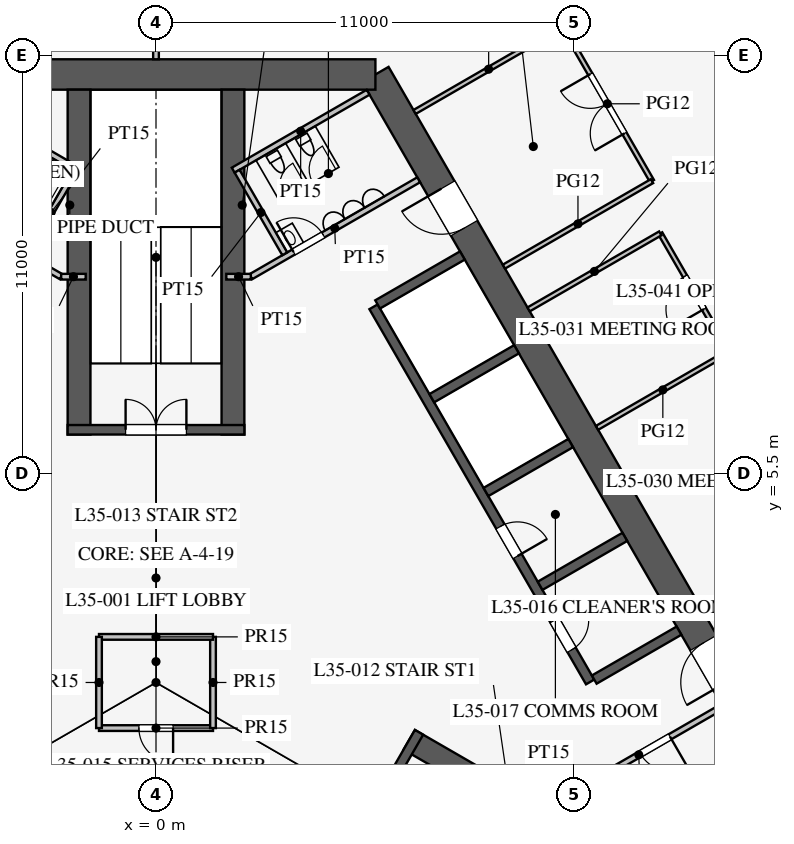
"""IFC4 building model, lengths in metres.
Left out: names, types, materials, properties, quantities, classifications, styles, units other than length and angle.
Written with IfcOpenShell. Run it as: python <this file> out.ifc"""

import sys

from ifc_helpers import new_model, si_unit, direction, frame, frame_2d, origin, place, context, subcontext, project, spatial, rectangle, extrude, element, fill, save


model = new_model("IFC4")
c1 = context("Model", 3, precision=1e-05, world=origin(), true_north=direction((0.0, 1.0)))
c2 = subcontext(c1, "Body", "Model", "MODEL_VIEW")
j1 = project(units=[si_unit("LENGTHUNIT", "METRE"), si_unit("PLANEANGLEUNIT", "RADIAN")], contexts=[c1])
p1 = place(None, origin())
s1 = spatial("IfcSite", under=j1, at=p1, CompositionType="ELEMENT")
p2 = place(p1, origin())
s2 = spatial("IfcBuilding", under=s1, at=p2, CompositionType="ELEMENT")
p3 = place(p2, frame((0.0, 0.0, 153.5)))
s3 = spatial("IfcBuildingStorey", under=s2, at=p3, CompositionType="ELEMENT", Elevation=153.5)
p4 = place(p3, frame((16.743, -3.0, 0.0), z_axis=(0.0, 0.0, 1.0), x_axis=(-0.500002442456, 0.866023993627, 0.0)))
e1 = element("IfcWall", 1, at=p4, inside=s3, PredefinedType="SHEAR", context=c2, shape_type="SweptSolid", body=[
    extrude(rectangle(XDim=21.939, YDim=0.8, at=frame_2d((10.97, 0.0))), origin(), (0.0, 0.0, 1.0), 4.2),
])
p5 = place(p4, frame((17.27, 0.0, 0.0)))
e2 = element("IfcOpeningElement", 2, at=p5, cuts=e1, PredefinedType="OPENING", context=c2, shape_type="SweptSolid", body=[
    extrude(rectangle(XDim=1.2, YDim=2.1, at=frame_2d((0.6, 1.05))), frame((0.0, 0.41, 0.0), z_axis=(0.0, -1.0, 0.0), x_axis=(1.0, 0.0, 0.0)), (0.0, 0.0, 1.0), 0.82),
])
p6 = place(p4, frame((3.47, 0.0, 0.0)))
e3 = element("IfcOpeningElement", 3, at=p6, cuts=e1, PredefinedType="OPENING", context=c2, shape_type="SweptSolid", body=[
    extrude(rectangle(XDim=1.2, YDim=2.1, at=frame_2d((0.6, 1.05))), frame((0.0, 0.41, 0.0), z_axis=(0.0, -1.0, 0.0), x_axis=(1.0, 0.0, 0.0)), (0.0, 0.0, 1.0), 0.82),
])
p7 = place(p3, frame((5.773, 16.0, 0.0), z_axis=(0.0, 0.0, 1.0), x_axis=(-1.0, 0.0, 0.0)))
e4 = element("IfcWall", 4, at=p7, inside=s3, PredefinedType="SHEAR", context=c2, shape_type="SweptSolid", body=[
    extrude(rectangle(XDim=11.547, YDim=0.8, at=frame_2d((5.773, 0.0))), origin(), (0.0, 0.0, 1.0), 4.2),
])
p8 = place(p3, frame((11.424, 0.014, 0.0), z_axis=(0.0, 0.0, 1.0), x_axis=(-0.500001763848, 0.866024385424, 0.0)))
e5 = element("IfcWall", 5, at=p8, inside=s3, PredefinedType="SHEAR", context=c2, shape_type="SweptSolid", body=[
    extrude(rectangle(XDim=11.4, YDim=0.25, at=frame_2d((5.7, 0.0))), origin(), (0.0, 0.0, 1.0), 4.2),
])
p9 = place(p8, frame((0.975, 0.0, 0.0)))
e6 = element("IfcOpeningElement", 6, at=p9, cuts=e5, PredefinedType="OPENING", context=c2, shape_type="SweptSolid", body=[
    extrude(rectangle(XDim=0.9, YDim=2.1, at=frame_2d((0.45, 1.05))), frame((0.0, 0.135, 0.0), z_axis=(0.0, -1.0, 0.0), x_axis=(1.0, 0.0, 0.0)), (0.0, 0.0, 1.0), 0.27),
])
p10 = place(p8, frame((3.825, 0.0, 0.0)))
e7 = element("IfcOpeningElement", 7, at=p10, cuts=e5, PredefinedType="OPENING", context=c2, shape_type="SweptSolid", body=[
    extrude(rectangle(XDim=0.9, YDim=2.1, at=frame_2d((0.45, 1.05))), frame((0.0, 0.135, 0.0), z_axis=(0.0, -1.0, 0.0), x_axis=(1.0, 0.0, 0.0)), (0.0, 0.0, 1.0), 0.27),
])
for number, where, z_axis, x_axis in (
    (8, (11.532, 0.076, 0.0), (0.0, 0.0, 1.0), (0.866, 0.5, 0.0)),
    (9, (10.107, 2.544, 0.0), (0.0, 0.0, 1.0), (0.866, 0.5, 0.0)),
    (10, (8.682, 5.012, 0.0), (0.0, 0.0, 1.0), (0.866, 0.5, 0.0)),
    (11, (7.257, 7.481, 0.0), (0.0, 0.0, 1.0), (0.866, 0.5, 0.0)),
):
    element("IfcWall", number, at=place(p3, frame(where, z_axis=z_axis, x_axis=x_axis)), inside=s3, PredefinedType="SHEAR", context=c2, shape_type="SweptSolid", body=[
        extrude(rectangle(XDim=2.575, YDim=0.25, at=frame_2d((1.288, 0.0))), origin(), (0.0, 0.0, 1.0), 4.2),
    ])
p11 = place(p3, frame((5.832, 9.949, 0.0), z_axis=(0.0, 0.0, 1.0), x_axis=(0.866029291668, 0.499993265928, 0.0)))
e12 = element("IfcWall", 12, at=p11, inside=s3, PredefinedType="SHEAR", context=c2, shape_type="SweptSolid", body=[
    extrude(rectangle(XDim=2.575, YDim=0.25, at=frame_2d((1.288, 0.0))), origin(), (0.0, 0.0, 1.0), 4.2),
])
p12 = place(p3, frame((6.663, -1.509, 0.0), z_axis=(0.0, 0.0, 1.0), x_axis=(0.866019375473, -0.500010441196, 0.0)))
e13 = element("IfcWall", 13, at=p12, inside=s3, PredefinedType="SHEAR", context=c2, shape_type="SweptSolid", body=[
    extrude(rectangle(XDim=9.075, YDim=0.6, at=frame_2d((4.538, 0.0))), origin(), (0.0, 0.0, 1.0), 4.2),
])
p13 = place(p3, frame((4.597, -5.339, 0.0), z_axis=(0.0, 0.0, 1.0), x_axis=(0.499984536904, 0.866034331223, 0.0)))
e14 = element("IfcWall", 14, at=p13, inside=s3, PredefinedType="SHEAR", context=c2, shape_type="SweptSolid", body=[
    extrude(rectangle(XDim=4.65, YDim=0.25, at=frame_2d((2.325, 0.0))), origin(), (0.0, 0.0, 1.0), 4.2),
])
p14 = place(p13, frame((1.525, 0.0, 0.0)))
e15 = element("IfcOpeningElement", 15, at=p14, cuts=e14, PredefinedType="OPENING", context=c2, shape_type="SweptSolid", body=[
    extrude(rectangle(XDim=1.6, YDim=2.1, at=frame_2d((0.8, 1.05))), frame((0.0, 0.135, 0.0), z_axis=(0.0, -1.0, 0.0), x_axis=(1.0, 0.0, 0.0)), (0.0, 0.0, 1.0), 0.27),
])
for number, where, z_axis, x_axis in (
    (16, (2.025, 6.525, 0.0), (0.0, 0.0, 1.0), (0.0, 1.0, 0.0)),
    (17, (-2.025, 6.525, 0.0), (0.0, 0.0, 1.0), (0.0, 1.0, 0.0)),
):
    element("IfcWall", number, at=place(p3, frame(where, z_axis=z_axis, x_axis=x_axis)), inside=s3, PredefinedType="SHEAR", context=c2, shape_type="SweptSolid", body=[
        extrude(rectangle(XDim=9.075, YDim=0.6, at=frame_2d((4.538, 0.0))), origin(), (0.0, 0.0, 1.0), 4.2),
    ])
p15 = place(p3, frame((2.325, 6.65, 0.0), z_axis=(0.0, 0.0, 1.0), x_axis=(-1.0, 0.0, 0.0)))
e18 = element("IfcWall", 18, at=p15, inside=s3, PredefinedType="SHEAR", context=c2, shape_type="SweptSolid", body=[
    extrude(rectangle(XDim=4.65, YDim=0.25, at=frame_2d((2.325, 0.0))), origin(), (0.0, 0.0, 1.0), 4.2),
])
p16 = place(p15, frame((1.525, 0.0, 0.0)))
e19 = element("IfcOpeningElement", 19, at=p16, cuts=e18, PredefinedType="OPENING", context=c2, shape_type="SweptSolid", body=[
    extrude(rectangle(XDim=1.6, YDim=2.1, at=frame_2d((0.8, 1.05))), frame((0.0, 0.135, 0.0), z_axis=(0.0, -1.0, 0.0), x_axis=(1.0, 0.0, 0.0)), (0.0, 0.0, 1.0), 0.27),
])
p17 = place(p3, frame((2.495, 10.678, 0.0), z_axis=(0.0, 0.0, 1.0), x_axis=(0.86602216432, 0.500005610874, 0.0)))
e20 = element("IfcWall", 20, at=p17, inside=s3, PredefinedType="PARTITIONING", context=c2, shape_type="SweptSolid", body=[
    extrude(rectangle(XDim=5.1, YDim=0.15, at=frame_2d((2.55, 0.0))), origin(), (0.0, 0.0, 1.0), 4.0),
])
p18 = place(p17, frame((1.3, 0.0, 0.0)))
e21 = element("IfcOpeningElement", 21, at=p18, cuts=e20, PredefinedType="OPENING", context=c2, shape_type="SweptSolid", body=[
    extrude(rectangle(XDim=0.9, YDim=2.1, at=frame_2d((0.45, 1.05))), frame((0.0, 0.085, 0.0), z_axis=(0.0, -1.0, 0.0), x_axis=(1.0, 0.0, 0.0)), (0.0, 0.0, 1.0), 0.17),
])
p19 = place(p3, frame((10.495, -3.178, 0.0), z_axis=(0.0, 0.0, 1.0), x_axis=(0.86602216432, 0.500005610874, 0.0)))
e22 = element("IfcWall", 22, at=p19, inside=s3, PredefinedType="PARTITIONING", context=c2, shape_type="SweptSolid", body=[
    extrude(rectangle(XDim=5.1, YDim=0.15, at=frame_2d((2.55, 0.0))), origin(), (0.0, 0.0, 1.0), 4.0),
])
p20 = place(p19, frame((2.6, 0.0, 0.0)))
e23 = element("IfcOpeningElement", 23, at=p20, cuts=e22, PredefinedType="OPENING", context=c2, shape_type="SweptSolid", body=[
    extrude(rectangle(XDim=0.9, YDim=2.1, at=frame_2d((0.45, 1.05))), frame((0.0, 0.085, 0.0), z_axis=(0.0, -1.0, 0.0), x_axis=(1.0, 0.0, 0.0)), (0.0, 0.0, 1.0), 0.17),
])
p21 = place(p3, frame((-2.495, 10.678, 0.0), z_axis=(0.0, 0.0, 1.0), x_axis=(-0.86602216432, 0.500005610874, 0.0)))
e24 = element("IfcWall", 24, at=p21, inside=s3, PredefinedType="PARTITIONING", context=c2, shape_type="SweptSolid", body=[
    extrude(rectangle(XDim=5.1, YDim=0.15, at=frame_2d((2.55, 0.0))), origin(), (0.0, 0.0, 1.0), 4.0),
])
p22 = place(p21, frame((2.6, 0.0, 0.0)))
e25 = element("IfcOpeningElement", 25, at=p22, cuts=e24, PredefinedType="OPENING", context=c2, shape_type="SweptSolid", body=[
    extrude(rectangle(XDim=0.9, YDim=2.1, at=frame_2d((0.45, 1.05))), frame((0.0, 0.085, 0.0), z_axis=(0.0, -1.0, 0.0), x_axis=(1.0, 0.0, 0.0)), (0.0, 0.0, 1.0), 0.17),
])
for number, where, z_axis, x_axis in (
    (26, (2.495, 10.678, 0.0), (0.0, 0.0, 1.0), (-1.0, 0.0, 0.0)),
    (27, (-2.495, 10.678, 0.0), (0.0, 0.0, 1.0), (1.0, 0.0, 0.0)),
):
    element("IfcWall", number, at=place(p3, frame(where, z_axis=z_axis, x_axis=x_axis)), inside=s3, PredefinedType="PARTITIONING", context=c2, shape_type="SweptSolid", body=[
        extrude(rectangle(XDim=0.645, YDim=0.15, at=frame_2d((0.323, 0.0))), origin(), (0.0, 0.0, 1.0), 4.0),
    ])
p23 = place(p3, frame((2.031, 13.482, 0.0), z_axis=(0.0, 0.0, 1.0), x_axis=(0.866050731258, 0.499956128963, 0.0)))
e28 = element("IfcWall", 28, at=p23, inside=s3, PredefinedType="PARTITIONING", context=c2, shape_type="SweptSolid", body=[
    extrude(rectangle(XDim=4.1, YDim=0.15, at=frame_2d((2.05, 0.0))), origin(), (0.0, 0.0, 1.0), 4.0),
])
p24 = place(p3, frame((3.389, 11.281, 0.0), z_axis=(0.0, 0.0, 1.0), x_axis=(-0.499989096993, 0.866031698547, 0.0)))
e29 = element("IfcWall", 29, at=p24, inside=s3, PredefinedType="PARTITIONING", context=c2, shape_type="SweptSolid", body=[
    extrude(rectangle(XDim=2.51, YDim=0.15, at=frame_2d((1.255, 0.0))), origin(), (0.0, 0.0, 1.0), 4.0),
])
p25 = place(p3, frame((-2.031, 13.482, 0.0), z_axis=(0.0, 0.0, 1.0), x_axis=(-0.866050731258, 0.499956128963, 0.0)))
e30 = element("IfcWall", 30, at=p25, inside=s3, PredefinedType="PARTITIONING", context=c2, shape_type="SweptSolid", body=[
    extrude(rectangle(XDim=4.1, YDim=0.15, at=frame_2d((2.05, 0.0))), origin(), (0.0, 0.0, 1.0), 4.0),
])
p26 = place(p3, frame((-3.389, 11.281, 0.0), z_axis=(0.0, 0.0, 1.0), x_axis=(0.499989096993, 0.866031698547, 0.0)))
e31 = element("IfcWall", 31, at=p26, inside=s3, PredefinedType="PARTITIONING", context=c2, shape_type="SweptSolid", body=[
    extrude(rectangle(XDim=2.51, YDim=0.15, at=frame_2d((1.255, 0.0))), origin(), (0.0, 0.0, 1.0), 4.0),
])
p27 = place(p3, frame((-1.5, -1.2, 0.0), z_axis=(0.0, 0.0, 1.0), x_axis=(1.0, 0.0, 0.0)))
e32 = element("IfcWall", 32, at=p27, inside=s3, PredefinedType="PARTITIONING", context=c2, shape_type="SweptSolid", body=[
    extrude(rectangle(XDim=3.0, YDim=0.15, at=frame_2d((1.5, 0.0))), origin(), (0.0, 0.0, 1.0), 4.0),
])
p28 = place(p27, frame((1.05, 0.0, 0.0)))
e33 = element("IfcOpeningElement", 33, at=p28, cuts=e32, PredefinedType="OPENING", context=c2, shape_type="SweptSolid", body=[
    extrude(rectangle(XDim=0.9, YDim=2.1, at=frame_2d((0.45, 1.05))), frame((0.0, 0.085, 0.0), z_axis=(0.0, -1.0, 0.0), x_axis=(1.0, 0.0, 0.0)), (0.0, 0.0, 1.0), 0.17),
])
p29 = place(p3, frame((1.5, -1.2, 0.0), z_axis=(0.0, 0.0, 1.0), x_axis=(0.0, 1.0, 0.0)))
e34 = element("IfcWall", 34, at=p29, inside=s3, PredefinedType="PARTITIONING", context=c2, shape_type="SweptSolid", body=[
    extrude(rectangle(XDim=2.4, YDim=0.15, at=frame_2d((1.2, 0.0))), origin(), (0.0, 0.0, 1.0), 4.0),
])
p30 = place(p3, frame((1.5, 1.2, 0.0), z_axis=(0.0, 0.0, 1.0), x_axis=(-1.0, 0.0, 0.0)))
e35 = element("IfcWall", 35, at=p30, inside=s3, PredefinedType="PARTITIONING", context=c2, shape_type="SweptSolid", body=[
    extrude(rectangle(XDim=3.0, YDim=0.15, at=frame_2d((1.5, 0.0))), origin(), (0.0, 0.0, 1.0), 4.0),
])
p31 = place(p3, frame((-1.5, 1.2, 0.0), z_axis=(0.0, 0.0, 1.0), x_axis=(0.0, -1.0, 0.0)))
e36 = element("IfcWall", 36, at=p31, inside=s3, PredefinedType="PARTITIONING", context=c2, shape_type="SweptSolid", body=[
    extrude(rectangle(XDim=2.4, YDim=0.15, at=frame_2d((1.2, 0.0))), origin(), (0.0, 0.0, 1.0), 4.0),
])
p32 = place(p3, frame((0.0, 16.4, 0.0), z_axis=(0.0, 0.0, 1.0), x_axis=(0.0, 1.0, 0.0)))
e37 = element("IfcWall", 37, at=p32, inside=s3, PredefinedType="PARTITIONING", context=c2, shape_type="SweptSolid", body=[
    extrude(rectangle(XDim=16.65, YDim=0.15, at=frame_2d((8.325, 0.0))), origin(), (0.0, 0.0, 1.0), 2.3),
])
p33 = place(p3, frame((13.052, 13.194, 0.0), z_axis=(0.0, 0.0, 1.0), x_axis=(-0.499977259774, 0.866038532462, 0.0)))
e38 = element("IfcWall", 38, at=p33, inside=s3, PredefinedType="PARTITIONING", context=c2, shape_type="SweptSolid", body=[
    extrude(rectangle(XDim=4.7, YDim=0.12, at=frame_2d((2.35, 0.0))), origin(), (0.0, 0.0, 1.0), 2.9),
])
p34 = place(p33, frame((1.45, 0.0, 0.15)))
e39 = element("IfcOpeningElement", 39, at=p34, cuts=e38, PredefinedType="OPENING", context=c2, shape_type="SweptSolid", body=[
    extrude(rectangle(XDim=1.8, YDim=2.1, at=frame_2d((0.9, 1.05))), frame((0.0, 0.07, 0.0), z_axis=(0.0, -1.0, 0.0), x_axis=(1.0, 0.0, 0.0)), (0.0, 0.0, 1.0), 0.14),
])
p35 = place(p3, frame((15.069, 8.7, 0.0), z_axis=(0.0, 0.0, 1.0), x_axis=(-0.500012057535, 0.866018442252, 0.0)))
e40 = element("IfcWall", 40, at=p35, inside=s3, PredefinedType="PARTITIONING", context=c2, shape_type="SweptSolid", body=[
    extrude(rectangle(XDim=3.6, YDim=0.12, at=frame_2d((1.8, 0.0))), origin(), (0.0, 0.0, 1.0), 2.9),
])
p36 = place(p35, frame((1.3, 0.0, 0.15)))
e41 = element("IfcOpeningElement", 41, at=p36, cuts=e40, PredefinedType="OPENING", context=c2, shape_type="SweptSolid", body=[
    extrude(rectangle(XDim=1.0, YDim=2.1, at=frame_2d((0.5, 1.05))), frame((0.0, 0.07, 0.0), z_axis=(0.0, -1.0, 0.0), x_axis=(1.0, 0.0, 0.0)), (0.0, 0.0, 1.0), 0.14),
])
p37 = place(p3, frame((9.805, 9.818, 0.0), z_axis=(0.0, 0.0, 1.0), x_axis=(0.866026010844, 0.49999894854, 0.0)))
e42 = element("IfcWall", 42, at=p37, inside=s3, PredefinedType="PARTITIONING", context=c2, shape_type="SweptSolid", body=[
    extrude(rectangle(XDim=4.0, YDim=0.12, at=frame_2d((2.0, 0.0))), origin(), (0.0, 0.0, 1.0), 2.9),
])
p38 = place(p3, frame((9.155, 10.944, 0.0), z_axis=(0.0, 0.0, 1.0), x_axis=(0.866017533419, 0.500013631625, 0.0)))
e43 = element("IfcWall", 43, at=p38, inside=s3, PredefinedType="PARTITIONING", context=c2, shape_type="SweptSolid", body=[
    extrude(rectangle(XDim=4.5, YDim=0.12, at=frame_2d((2.25, 0.0))), origin(), (0.0, 0.0, 1.0), 2.9),
])
p39 = place(p3, frame((6.805, 15.014, 0.0), z_axis=(0.0, 0.0, 1.0), x_axis=(0.866031096941, 0.499990139034, 0.0)))
e44 = element("IfcWall", 44, at=p39, inside=s3, PredefinedType="PARTITIONING", context=c2, shape_type="SweptSolid", body=[
    extrude(rectangle(XDim=4.5, YDim=0.12, at=frame_2d((2.25, 0.0))), origin(), (0.0, 0.0, 1.0), 2.9),
])
p40 = place(p3, frame((11.605, 6.7, 0.0), z_axis=(0.0, 0.0, 1.0), x_axis=(0.866026010844, 0.49999894854, 0.0)))
e45 = element("IfcWall", 45, at=p40, inside=s3, PredefinedType="PARTITIONING", context=c2, shape_type="SweptSolid", body=[
    extrude(rectangle(XDim=4.0, YDim=0.12, at=frame_2d((2.0, 0.0))), origin(), (0.0, 0.0, 1.0), 2.8),
])
p41 = place(p3, frame((14.405, 1.85, 0.0), z_axis=(0.0, 0.0, 1.0), x_axis=(0.866026010844, 0.49999894854, 0.0)))
e46 = element("IfcWall", 46, at=p41, inside=s3, PredefinedType="PARTITIONING", context=c2, shape_type="SweptSolid", body=[
    extrude(rectangle(XDim=4.0, YDim=0.12, at=frame_2d((2.0, 0.0))), origin(), (0.0, 0.0, 1.0), 2.9),
])
p42 = place(p3, frame((16.256, 14.581, 0.0), z_axis=(0.0, 0.0, 1.0), x_axis=(-0.546069464151, 0.837739900161, 0.0)))
e47 = element("IfcWall", 47, at=p42, inside=s3, PredefinedType="PARTITIONING", context=c2, shape_type="SweptSolid", body=[
    extrude(rectangle(XDim=4.507, YDim=0.12, at=frame_2d((2.253, 0.0))), origin(), (0.0, 0.0, 1.0), 2.9),
])
p43 = place(p42, frame((1.8, 0.0, 0.15)))
e48 = element("IfcOpeningElement", 48, at=p43, cuts=e47, PredefinedType="OPENING", context=c2, shape_type="SweptSolid", body=[
    extrude(rectangle(XDim=0.9, YDim=2.1, at=frame_2d((0.45, 1.05))), frame((0.0, 0.07, 0.0), z_axis=(0.0, -1.0, 0.0), x_axis=(1.0, 0.0, 0.0)), (0.0, 0.0, 1.0), 0.14),
])
p44 = place(p3, frame((-0.016, 30.491, 0.0), z_axis=(0.0, 0.0, 1.0), x_axis=(-0.50000091641, -0.866024874695, 0.0)))
e49 = element("IfcWall", 49, at=p44, inside=s3, PredefinedType="PARTITIONING", context=c2, shape_type="SweptSolid", body=[
    extrude(rectangle(XDim=52.796, YDim=0.12, at=frame_2d((26.398, 0.0))), origin(), (0.0, 0.0, 1.0), 2.9),
])
p45 = place(p44, frame((10.2, 0.0, 0.15)))
e50 = element("IfcOpeningElement", 50, at=p45, cuts=e49, PredefinedType="OPENING", context=c2, shape_type="SweptSolid", body=[
    extrude(rectangle(XDim=1.8, YDim=2.1, at=frame_2d((0.9, 1.05))), frame((0.0, 0.07, 0.0), z_axis=(0.0, -1.0, 0.0), x_axis=(1.0, 0.0, 0.0)), (0.0, 0.0, 1.0), 0.14),
])
p46 = place(p44, frame((40.8, 0.0, 0.15)))
e51 = element("IfcOpeningElement", 51, at=p46, cuts=e49, PredefinedType="OPENING", context=c2, shape_type="SweptSolid", body=[
    extrude(rectangle(XDim=1.8, YDim=2.1, at=frame_2d((0.9, 1.05))), frame((0.0, 0.07, 0.0), z_axis=(0.0, -1.0, 0.0), x_axis=(1.0, 0.0, 0.0)), (0.0, 0.0, 1.0), 0.14),
])
p47 = place(p18, origin())
e52 = element("IfcDoor", 52, at=p47, inside=s3, OperationType="SINGLE_SWING_LEFT", PredefinedType="DOOR", context=c2, shape_type="SweptSolid", body=[
    extrude(rectangle(XDim=0.9, YDim=2.1, at=frame_2d((0.45, 1.05))), frame((0.0, 0.025, 0.0), z_axis=(0.0, -1.0, 0.0), x_axis=(1.0, 0.0, 0.0)), (0.0, 0.0, 1.0), 0.05),
])
fill(e21, e52)
p48 = place(p20, frame((0.9, 0.0, 0.0), z_axis=(0.0, 0.0, 1.0), x_axis=(-1.0, 0.0, 0.0)))
e53 = element("IfcDoor", 53, at=p48, inside=s3, OperationType="SINGLE_SWING_LEFT", PredefinedType="DOOR", context=c2, shape_type="SweptSolid", body=[
    extrude(rectangle(XDim=0.9, YDim=2.1, at=frame_2d((0.45, 1.05))), frame((0.0, 0.025, 0.0), z_axis=(0.0, -1.0, 0.0), x_axis=(1.0, 0.0, 0.0)), (0.0, 0.0, 1.0), 0.05),
])
fill(e23, e53)
p49 = place(p28, frame((0.9, 0.0, 0.0), z_axis=(0.0, 0.0, 1.0), x_axis=(-1.0, 0.0, 0.0)))
e54 = element("IfcDoor", 54, at=p49, inside=s3, OperationType="SINGLE_SWING_LEFT", PredefinedType="DOOR", context=c2, shape_type="SweptSolid", body=[
    extrude(rectangle(XDim=0.9, YDim=2.1, at=frame_2d((0.45, 1.05))), frame((0.0, 0.025, 0.0), z_axis=(0.0, -1.0, 0.0), x_axis=(1.0, 0.0, 0.0)), (0.0, 0.0, 1.0), 0.05),
])
fill(e33, e54)
p50 = place(p16, frame((1.6, 0.0, 0.0), z_axis=(0.0, 0.0, 1.0), x_axis=(-1.0, 0.0, 0.0)))
e55 = element("IfcDoor", 55, at=p50, inside=s3, OperationType="DOUBLE_DOOR_SINGLE_SWING", PredefinedType="DOOR", context=c2, shape_type="SweptSolid", body=[
    extrude(rectangle(XDim=1.6, YDim=2.1, at=frame_2d((0.8, 1.05))), frame((0.0, 0.025, 0.0), z_axis=(0.0, -1.0, 0.0), x_axis=(1.0, 0.0, 0.0)), (0.0, 0.0, 1.0), 0.05),
])
fill(e19, e55)
p51 = place(p5, origin())
e56 = element("IfcDoor", 56, at=p51, inside=s3, OperationType="SINGLE_SWING_RIGHT", PredefinedType="DOOR", context=c2, shape_type="SweptSolid", body=[
    extrude(rectangle(XDim=1.2, YDim=2.1, at=frame_2d((0.6, 1.05))), frame((0.0, 0.025, 0.0), z_axis=(0.0, -1.0, 0.0), x_axis=(1.0, 0.0, 0.0)), (0.0, 0.0, 1.0), 0.05),
])
fill(e2, e56)
p52 = place(p6, origin())
e57 = element("IfcDoor", 57, at=p52, inside=s3, OperationType="SINGLE_SWING_LEFT", PredefinedType="DOOR", context=c2, shape_type="SweptSolid", body=[
    extrude(rectangle(XDim=1.2, YDim=2.1, at=frame_2d((0.6, 1.05))), frame((0.0, 0.025, 0.0), z_axis=(0.0, -1.0, 0.0), x_axis=(1.0, 0.0, 0.0)), (0.0, 0.0, 1.0), 0.05),
])
fill(e3, e57)
p53 = place(p9, frame((0.9, 0.0, 0.0), z_axis=(0.0, 0.0, 1.0), x_axis=(-1.0, 0.0, 0.0)))
e58 = element("IfcDoor", 58, at=p53, inside=s3, OperationType="SINGLE_SWING_LEFT", PredefinedType="DOOR", context=c2, shape_type="SweptSolid", body=[
    extrude(rectangle(XDim=0.9, YDim=2.1, at=frame_2d((0.45, 1.05))), frame((0.0, 0.025, 0.0), z_axis=(0.0, -1.0, 0.0), x_axis=(1.0, 0.0, 0.0)), (0.0, 0.0, 1.0), 0.05),
])
fill(e6, e58)
p54 = place(p10, frame((0.9, 0.0, 0.0), z_axis=(0.0, 0.0, 1.0), x_axis=(-1.0, 0.0, 0.0)))
e59 = element("IfcDoor", 59, at=p54, inside=s3, OperationType="SINGLE_SWING_RIGHT", PredefinedType="DOOR", context=c2, shape_type="SweptSolid", body=[
    extrude(rectangle(XDim=0.9, YDim=2.1, at=frame_2d((0.45, 1.05))), frame((0.0, 0.025, 0.0), z_axis=(0.0, -1.0, 0.0), x_axis=(1.0, 0.0, 0.0)), (0.0, 0.0, 1.0), 0.05),
])
fill(e7, e59)
p55 = place(p34, origin())
e60 = element("IfcDoor", 60, at=p55, inside=s3, OperationType="DOUBLE_DOOR_SINGLE_SWING", PredefinedType="DOOR", context=c2, shape_type="SweptSolid", body=[
    extrude(rectangle(XDim=1.8, YDim=2.1, at=frame_2d((0.9, 1.05))), frame((0.0, 0.025, 0.0), z_axis=(0.0, -1.0, 0.0), x_axis=(1.0, 0.0, 0.0)), (0.0, 0.0, 1.0), 0.05),
])
fill(e39, e60)
p56 = place(p36, origin())
e61 = element("IfcDoor", 61, at=p56, inside=s3, OperationType="SINGLE_SWING_LEFT", PredefinedType="DOOR", context=c2, shape_type="SweptSolid", body=[
    extrude(rectangle(XDim=1.0, YDim=2.1, at=frame_2d((0.5, 1.05))), frame((0.0, 0.025, 0.0), z_axis=(0.0, -1.0, 0.0), x_axis=(1.0, 0.0, 0.0)), (0.0, 0.0, 1.0), 0.05),
])
fill(e41, e61)
save(model, sys.argv[1])
